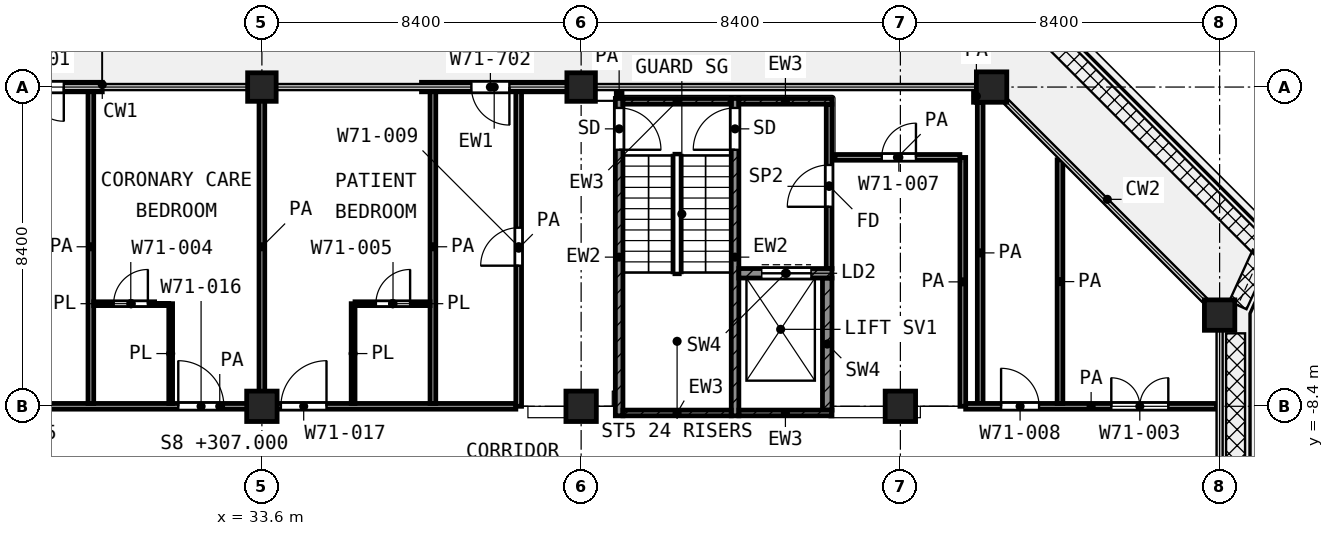
"""IFC4 building model, lengths in metres.
Left out: names, types, materials, properties, quantities, classifications, styles, units other than length and angle.
Written with IfcOpenShell. Run it as: python <this file> out.ifc"""

import sys

from ifc_helpers import new_model, si_unit, direction, frame, frame_2d, origin, origin_2d, place, context, subcontext, project, spatial, rectangle, extrude, element, fill, save


model = new_model("IFC4")
c1 = context("Model", 3, precision=1e-05, world=origin(), true_north=direction((0.0, 1.0)))
c2 = subcontext(c1, "Body", "Model", "MODEL_VIEW")
j1 = project(units=[si_unit("LENGTHUNIT", "METRE"), si_unit("PLANEANGLEUNIT", "RADIAN")], contexts=[c1])
p1 = place(None, origin())
s1 = spatial("IfcSite", under=j1, at=p1, CompositionType="ELEMENT")
p2 = place(p1, origin())
s2 = spatial("IfcBuilding", under=s1, at=p2, CompositionType="ELEMENT")
p3 = place(p2, frame((0.0, 0.0, 307.0)))
s3 = spatial("IfcBuildingStorey", under=s2, at=p3, CompositionType="ELEMENT", Elevation=307.0)
for number, where, z_axis, x_axis in (
    (1, (33.6, 0.0, 0.0), (0.0, 0.0, 1.0), (1.0, 0.0, 0.0)),
    (2, (42.0, 0.0, 0.0), (0.0, 0.0, 1.0), (1.0, 0.0, 0.0)),
):
    element("IfcColumn", number, at=place(p3, frame(where, z_axis=z_axis, x_axis=x_axis)), inside=s3, PredefinedType="COLUMN", context=c2, shape_type="SweptSolid", body=[
        extrude(rectangle(XDim=0.75, YDim=0.75, at=origin_2d()), origin(), (0.0, 0.0, 1.0), 4.2),
    ])
for number, where, z_axis, x_axis in (
    (3, (52.8, 0.0, 0.0), (0.0, 0.0, 1.0), (1.0, 0.0, 0.0)),
    (4, (58.8, -6.0, 0.0), (0.0, 0.0, 1.0), (1.0, 0.0, 0.0)),
    (5, (33.6, -8.4, 0.0), (0.0, 0.0, 1.0), (1.0, 0.0, 0.0)),
    (6, (42.0, -8.4, 0.0), (0.0, 0.0, 1.0), (1.0, 0.0, 0.0)),
    (7, (50.4, -8.4, 0.0), (0.0, 0.0, 1.0), (1.0, 0.0, 0.0)),
):
    element("IfcColumn", number, at=place(p3, frame(where, z_axis=z_axis, x_axis=x_axis)), inside=s3, PredefinedType="COLUMN", context=c2, shape_type="SweptSolid", body=[
        extrude(rectangle(XDim=0.8, YDim=0.8, at=origin_2d()), origin(), (0.0, 0.0, 1.0), 4.2),
    ])
p4 = place(p3, frame((41.625, 0.0, 0.0), z_axis=(0.0, 0.0, 1.0), x_axis=(-1.0, 0.0, 0.0)))
e8 = element("IfcWall", 8, at=p4, inside=s3, PredefinedType="SOLIDWALL", context=c2, shape_type="SweptSolid", body=[
    extrude(rectangle(XDim=3.825, YDim=0.25, at=frame_2d((1.913, 0.0))), origin(), (0.0, 0.0, 1.0), 3.48),
])
p5 = place(p4, frame((1.512, 0.0, 0.0)))
e9 = element("IfcOpeningElement", 9, at=p5, cuts=e8, PredefinedType="OPENING", context=c2, shape_type="SweptSolid", body=[
    extrude(rectangle(XDim=1.0, YDim=2.1, at=frame_2d((0.5, 1.05))), frame((0.0, 0.135, 0.0), z_axis=(0.0, -1.0, 0.0), x_axis=(1.0, 0.0, 0.0)), (0.0, 0.0, 1.0), 0.27),
])
p6 = place(p3, frame((29.4, 0.0, 0.0), z_axis=(0.0, 0.0, 1.0), x_axis=(-1.0, 0.0, 0.0)))
e10 = element("IfcWall", 10, at=p6, inside=s3, PredefinedType="SOLIDWALL", context=c2, shape_type="SweptSolid", body=[
    extrude(rectangle(XDim=3.825, YDim=0.25, at=frame_2d((1.913, 0.0))), origin(), (0.0, 0.0, 1.0), 3.48),
])
p7 = place(p6, frame((1.012, 0.0, 0.0)))
e11 = element("IfcOpeningElement", 11, at=p7, cuts=e10, PredefinedType="OPENING", context=c2, shape_type="SweptSolid", body=[
    extrude(rectangle(XDim=1.8, YDim=2.1, at=frame_2d((0.9, 1.05))), frame((0.0, 0.135, 0.0), z_axis=(0.0, -1.0, 0.0), x_axis=(1.0, 0.0, 0.0)), (0.0, 0.0, 1.0), 0.27),
])
p8 = place(p3, frame((43.0, -8.65, 0.0), z_axis=(0.0, 0.0, 1.0), x_axis=(0.0, 1.0, 0.0)))
e12 = element("IfcWall", 12, at=p8, inside=s3, PredefinedType="SHEAR", context=c2, shape_type="SweptSolid", body=[
    extrude(rectangle(XDim=8.35, YDim=0.2, at=frame_2d((4.175, 0.0))), origin(), (0.0, 0.0, 1.0), 3.6),
])
p9 = place(p8, frame((7.0, 0.0, 0.0)))
e13 = element("IfcOpeningElement", 13, at=p9, cuts=e12, PredefinedType="OPENING", context=c2, shape_type="SweptSolid", body=[
    extrude(rectangle(XDim=1.1, YDim=2.1, at=frame_2d((0.55, 1.05))), frame((0.0, 0.11, 0.0), z_axis=(0.0, -1.0, 0.0), x_axis=(1.0, 0.0, 0.0)), (0.0, 0.0, 1.0), 0.22),
])
p10 = place(p3, frame((46.05, -8.65, 0.0), z_axis=(0.0, 0.0, 1.0), x_axis=(0.0, 1.0, 0.0)))
e14 = element("IfcWall", 14, at=p10, inside=s3, PredefinedType="SHEAR", context=c2, shape_type="SweptSolid", body=[
    extrude(rectangle(XDim=8.35, YDim=0.2, at=frame_2d((4.175, 0.0))), origin(), (0.0, 0.0, 1.0), 3.6),
])
p11 = place(p10, frame((7.0, 0.0, 0.0)))
e15 = element("IfcOpeningElement", 15, at=p11, cuts=e14, PredefinedType="OPENING", context=c2, shape_type="SweptSolid", body=[
    extrude(rectangle(XDim=1.1, YDim=2.1, at=frame_2d((0.55, 1.05))), frame((0.0, 0.11, 0.0), z_axis=(0.0, -1.0, 0.0), x_axis=(1.0, 0.0, 0.0)), (0.0, 0.0, 1.0), 0.22),
])
p12 = place(p3, frame((43.1, -0.375, 0.0), z_axis=(0.0, 0.0, 1.0), x_axis=(1.0, 0.0, 0.0)))
e16 = element("IfcWall", 16, at=p12, inside=s3, PredefinedType="SHEAR", context=c2, shape_type="SweptSolid", body=[
    extrude(rectangle(XDim=2.85, YDim=0.15, at=frame_2d((1.425, 0.0))), origin(), (0.0, 0.0, 1.0), 3.6),
])
p13 = place(p3, frame((46.15, -0.375, 0.0), z_axis=(0.0, 0.0, 1.0), x_axis=(1.0, 0.0, 0.0)))
e17 = element("IfcWall", 17, at=p13, inside=s3, PredefinedType="SHEAR", context=c2, shape_type="SweptSolid", body=[
    extrude(rectangle(XDim=2.45, YDim=0.15, at=frame_2d((1.225, 0.0))), origin(), (0.0, 0.0, 1.0), 3.6),
])
p14 = place(p3, frame((43.1, -8.575, 0.0), z_axis=(0.0, 0.0, 1.0), x_axis=(1.0, 0.0, 0.0)))
e18 = element("IfcWall", 18, at=p14, inside=s3, PredefinedType="SHEAR", context=c2, shape_type="SweptSolid", body=[
    extrude(rectangle(XDim=2.85, YDim=0.15, at=frame_2d((1.425, 0.0))), origin(), (0.0, 0.0, 1.0), 3.6),
])
p15 = place(p3, frame((46.15, -8.575, 0.0), z_axis=(0.0, 0.0, 1.0), x_axis=(1.0, 0.0, 0.0)))
e19 = element("IfcWall", 19, at=p15, inside=s3, PredefinedType="SHEAR", context=c2, shape_type="SweptSolid", body=[
    extrude(rectangle(XDim=2.45, YDim=0.15, at=frame_2d((1.225, 0.0))), origin(), (0.0, 0.0, 1.0), 3.6),
])
p16 = place(p3, frame((46.15, -4.9, 0.0), z_axis=(0.0, 0.0, 1.0), x_axis=(1.0, 0.0, 0.0)))
e20 = element("IfcWall", 20, at=p16, inside=s3, PredefinedType="SHEAR", context=c2, shape_type="SweptSolid", body=[
    extrude(rectangle(XDim=2.45, YDim=0.25, at=frame_2d((1.225, 0.0))), origin(), (0.0, 0.0, 1.0), 3.6),
])
p17 = place(p16, frame((0.6, 0.0, 0.0)))
e21 = element("IfcOpeningElement", 21, at=p17, cuts=e20, PredefinedType="OPENING", context=c2, shape_type="SweptSolid", body=[
    extrude(rectangle(XDim=1.3, YDim=2.1, at=frame_2d((0.65, 1.05))), frame((0.0, 0.135, 0.0), z_axis=(0.0, -1.0, 0.0), x_axis=(1.0, 0.0, 0.0)), (0.0, 0.0, 1.0), 0.27),
])
p18 = place(p3, frame((48.475, -8.5, 0.0), z_axis=(0.0, 0.0, 1.0), x_axis=(0.0, 1.0, 0.0)))
e22 = element("IfcWall", 22, at=p18, inside=s3, PredefinedType="SHEAR", context=c2, shape_type="SweptSolid", body=[
    extrude(rectangle(XDim=3.475, YDim=0.25, at=frame_2d((1.738, 0.0))), origin(), (0.0, 0.0, 1.0), 3.6),
])
p19 = place(p3, frame((48.525, -4.775, 0.0), z_axis=(0.0, 0.0, 1.0), x_axis=(0.0, 1.0, 0.0)))
e23 = element("IfcWall", 23, at=p19, inside=s3, PredefinedType="PARTITIONING", context=c2, shape_type="SweptSolid", body=[
    extrude(rectangle(XDim=4.325, YDim=0.15, at=frame_2d((2.163, 0.0))), origin(), (0.0, 0.0, 1.0), 3.6),
])
p20 = place(p19, frame((1.625, 0.0, 0.0)))
e24 = element("IfcOpeningElement", 24, at=p20, cuts=e23, PredefinedType="OPENING", context=c2, shape_type="SweptSolid", body=[
    extrude(rectangle(XDim=1.1, YDim=2.1, at=frame_2d((0.55, 1.05))), frame((0.0, 0.085, 0.0), z_axis=(0.0, -1.0, 0.0), x_axis=(1.0, 0.0, 0.0)), (0.0, 0.0, 1.0), 0.17),
])
p21 = place(p3, frame((29.175, -5.7, 0.0), z_axis=(0.0, 0.0, 1.0), x_axis=(1.0, 0.0, 0.0)))
e25 = element("IfcWall", 25, at=p21, inside=s3, PredefinedType="PARTITIONING", context=c2, shape_type="SweptSolid", body=[
    extrude(rectangle(XDim=1.975, YDim=0.1, at=frame_2d((0.987, 0.0))), origin(), (0.0, 0.0, 1.0), 3.6),
])
p22 = place(p21, frame((0.525, 0.0, 0.0)))
e26 = element("IfcOpeningElement", 26, at=p22, cuts=e25, PredefinedType="OPENING", context=c2, shape_type="SweptSolid", body=[
    extrude(rectangle(XDim=0.9, YDim=2.1, at=frame_2d((0.45, 1.05))), frame((0.0, 0.06, 0.0), z_axis=(0.0, -1.0, 0.0), x_axis=(1.0, 0.0, 0.0)), (0.0, 0.0, 1.0), 0.12),
])
p23 = place(p3, frame((36.05, -5.7, 0.0), z_axis=(0.0, 0.0, 1.0), x_axis=(1.0, 0.0, 0.0)))
e27 = element("IfcWall", 27, at=p23, inside=s3, PredefinedType="PARTITIONING", context=c2, shape_type="SweptSolid", body=[
    extrude(rectangle(XDim=1.975, YDim=0.1, at=frame_2d((0.987, 0.0))), origin(), (0.0, 0.0, 1.0), 3.6),
])
p24 = place(p23, frame((0.55, 0.0, 0.0)))
e28 = element("IfcOpeningElement", 28, at=p24, cuts=e27, PredefinedType="OPENING", context=c2, shape_type="SweptSolid", body=[
    extrude(rectangle(XDim=0.9, YDim=2.1, at=frame_2d((0.45, 1.05))), frame((0.0, 0.06, 0.0), z_axis=(0.0, -1.0, 0.0), x_axis=(1.0, 0.0, 0.0)), (0.0, 0.0, 1.0), 0.12),
])
for number, where, z_axis, x_axis in (
    (29, (31.2, -8.325, 0.0), (0.0, 0.0, 1.0), (0.0, 1.0, 0.0)),
    (30, (36.0, -8.325, 0.0), (0.0, 0.0, 1.0), (0.0, 1.0, 0.0)),
):
    element("IfcWall", number, at=place(p3, frame(where, z_axis=z_axis, x_axis=x_axis)), inside=s3, PredefinedType="PARTITIONING", context=c2, shape_type="SweptSolid", body=[
        extrude(rectangle(XDim=2.625, YDim=0.1, at=frame_2d((1.312, 0.0))), origin(), (0.0, 0.0, 1.0), 3.6),
    ])
p25 = place(p3, frame((24.7, -8.4, 0.0), z_axis=(0.0, 0.0, 1.0), x_axis=(1.0, 0.0, 0.0)))
e31 = element("IfcWall", 31, at=p25, inside=s3, PredefinedType="PARTITIONING", context=c2, shape_type="SweptSolid", body=[
    extrude(rectangle(XDim=15.582, YDim=0.15, at=frame_2d((7.791, 0.0))), origin(), (0.0, 0.0, 1.0), 3.6),
])
p26 = place(p25, frame((1.85, 0.0, 0.0)))
e32 = element("IfcOpeningElement", 32, at=p26, cuts=e31, PredefinedType="OPENING", context=c2, shape_type="SweptSolid", body=[
    extrude(rectangle(XDim=1.2, YDim=2.1, at=frame_2d((0.6, 1.05))), frame((0.0, 0.085, 0.0), z_axis=(0.0, -1.0, 0.0), x_axis=(1.0, 0.0, 0.0)), (0.0, 0.0, 1.0), 0.17),
])
p27 = place(p25, frame((6.7, 0.0, 0.0)))
e33 = element("IfcOpeningElement", 33, at=p27, cuts=e31, PredefinedType="OPENING", context=c2, shape_type="SweptSolid", body=[
    extrude(rectangle(XDim=1.2, YDim=2.1, at=frame_2d((0.6, 1.05))), frame((0.0, 0.085, 0.0), z_axis=(0.0, -1.0, 0.0), x_axis=(1.0, 0.0, 0.0)), (0.0, 0.0, 1.0), 0.17),
])
p28 = place(p25, frame((9.4, 0.0, 0.0)))
e34 = element("IfcOpeningElement", 34, at=p28, cuts=e31, PredefinedType="OPENING", context=c2, shape_type="SweptSolid", body=[
    extrude(rectangle(XDim=1.2, YDim=2.1, at=frame_2d((0.6, 1.05))), frame((0.0, 0.085, 0.0), z_axis=(0.0, -1.0, 0.0), x_axis=(1.0, 0.0, 0.0)), (0.0, 0.0, 1.0), 0.17),
])
p29 = place(p3, frame((52.118, -8.4, 0.0), z_axis=(0.0, 0.0, 1.0), x_axis=(1.0, 0.0, 0.0)))
e35 = element("IfcWall", 35, at=p29, inside=s3, PredefinedType="PARTITIONING", context=c2, shape_type="SweptSolid", body=[
    extrude(rectangle(XDim=6.602, YDim=0.15, at=frame_2d((3.301, 0.0))), origin(), (0.0, 0.0, 1.0), 3.6),
])
p30 = place(p29, frame((0.932, 0.0, 0.0)))
e36 = element("IfcOpeningElement", 36, at=p30, cuts=e35, PredefinedType="OPENING", context=c2, shape_type="SweptSolid", body=[
    extrude(rectangle(XDim=1.0, YDim=2.1, at=frame_2d((0.5, 1.05))), frame((0.0, 0.085, 0.0), z_axis=(0.0, -1.0, 0.0), x_axis=(1.0, 0.0, 0.0)), (0.0, 0.0, 1.0), 0.17),
])
p31 = place(p29, frame((3.832, 0.0, 0.0)))
e37 = element("IfcOpeningElement", 37, at=p31, cuts=e35, PredefinedType="OPENING", context=c2, shape_type="SweptSolid", body=[
    extrude(rectangle(XDim=1.5, YDim=2.1, at=frame_2d((0.75, 1.05))), frame((0.0, 0.085, 0.0), z_axis=(0.0, -1.0, 0.0), x_axis=(1.0, 0.0, 0.0)), (0.0, 0.0, 1.0), 0.17),
])
p32 = place(p3, frame((48.68, -1.85, 0.0), z_axis=(0.0, 0.0, 1.0), x_axis=(1.0, 0.0, 0.0)))
e38 = element("IfcWall", 38, at=p32, inside=s3, PredefinedType="PARTITIONING", context=c2, shape_type="SweptSolid", body=[
    extrude(rectangle(XDim=3.286, YDim=0.15, at=frame_2d((1.643, 0.0))), origin(), (0.0, 0.0, 1.0), 3.6),
])
p33 = place(p32, frame((1.23, 0.0, 0.0)))
e39 = element("IfcOpeningElement", 39, at=p33, cuts=e38, PredefinedType="OPENING", context=c2, shape_type="SweptSolid", body=[
    extrude(rectangle(XDim=0.9, YDim=2.1, at=frame_2d((0.45, 1.05))), frame((0.0, 0.085, 0.0), z_axis=(0.0, -1.0, 0.0), x_axis=(1.0, 0.0, 0.0)), (0.0, 0.0, 1.0), 0.17),
])
for number, where, z_axis, x_axis in (
    (40, (29.1, -8.325, 0.0), (0.0, 0.0, 1.0), (0.0, 1.0, 0.0)),
    (41, (33.6, -8.325, 0.0), (0.0, 0.0, 1.0), (0.0, 1.0, 0.0)),
    (42, (38.1, -8.325, 0.0), (0.0, 0.0, 1.0), (0.0, 1.0, 0.0)),
):
    element("IfcWall", number, at=place(p3, frame(where, z_axis=z_axis, x_axis=x_axis)), inside=s3, PredefinedType="PARTITIONING", context=c2, shape_type="SweptSolid", body=[
        extrude(rectangle(XDim=8.245, YDim=0.15, at=frame_2d((4.123, 0.0))), origin(), (0.0, 0.0, 1.0), 3.6),
    ])
p34 = place(p3, frame((40.357, -8.4, 0.0), z_axis=(0.0, 0.0, 1.0), x_axis=(0.0, 1.0, 0.0)))
e43 = element("IfcWall", 43, at=p34, inside=s3, PredefinedType="PARTITIONING", context=c2, shape_type="SweptSolid", body=[
    extrude(rectangle(XDim=8.32, YDim=0.15, at=frame_2d((4.16, 0.0))), origin(), (0.0, 0.0, 1.0), 3.6),
])
p35 = place(p34, frame((3.7, 0.0, 0.0)))
e44 = element("IfcOpeningElement", 44, at=p35, cuts=e43, PredefinedType="OPENING", context=c2, shape_type="SweptSolid", body=[
    extrude(rectangle(XDim=1.0, YDim=2.1, at=frame_2d((0.5, 1.05))), frame((0.0, 0.085, 0.0), z_axis=(0.0, -1.0, 0.0), x_axis=(1.0, 0.0, 0.0)), (0.0, 0.0, 1.0), 0.17),
])
p36 = place(p3, frame((43.0, -0.27, 0.0), z_axis=(0.0, 0.0, 1.0), x_axis=(0.0, 1.0, 0.0)))
e45 = element("IfcWall", 45, at=p36, inside=s3, PredefinedType="PARTITIONING", context=c2, shape_type="SweptSolid", body=[
    extrude(rectangle(XDim=0.19, YDim=0.15, at=frame_2d((0.095, 0.0))), origin(), (0.0, 0.0, 1.0), 3.6),
])
p37 = place(p3, frame((52.043, -8.4, 0.0), z_axis=(0.0, 0.0, 1.0), x_axis=(0.0, 1.0, 0.0)))
e46 = element("IfcWall", 46, at=p37, inside=s3, PredefinedType="PARTITIONING", context=c2, shape_type="SweptSolid", body=[
    extrude(rectangle(XDim=6.548, YDim=0.15, at=frame_2d((3.274, 0.0))), origin(), (0.0, 0.0, 1.0), 3.6),
])
p38 = place(p3, frame((52.4, -0.4, 0.0), z_axis=(0.0, 0.0, 1.0), x_axis=(0.0, 1.0, 0.0)))
e47 = element("IfcWall", 47, at=p38, inside=s3, PredefinedType="PARTITIONING", context=c2, shape_type="SweptSolid", body=[
    extrude(rectangle(XDim=0.32, YDim=0.15, at=frame_2d((0.16, 0.0))), origin(), (0.0, 0.0, 1.0), 3.6),
])
p39 = place(p3, frame((52.5, -8.325, 0.0), z_axis=(0.0, 0.0, 1.0), x_axis=(0.0, 1.0, 0.0)))
e48 = element("IfcWall", 48, at=p39, inside=s3, PredefinedType="PARTITIONING", context=c2, shape_type="SweptSolid", body=[
    extrude(rectangle(XDim=7.923, YDim=0.15, at=frame_2d((3.961, 0.0))), origin(), (0.0, 0.0, 1.0), 3.6),
])
p40 = place(p3, frame((54.6, -8.325, 0.0), z_axis=(0.0, 0.0, 1.0), x_axis=(0.0, 1.0, 0.0)))
e49 = element("IfcWall", 49, at=p40, inside=s3, PredefinedType="PARTITIONING", context=c2, shape_type="SweptSolid", body=[
    extrude(rectangle(XDim=6.412, YDim=0.15, at=frame_2d((3.206, 0.0))), origin(), (0.0, 0.0, 1.0), 3.6),
])
p41 = place(p5, origin())
e50 = element("IfcDoor", 50, at=p41, inside=s3, OperationType="SINGLE_SWING_LEFT", PredefinedType="DOOR", context=c2, shape_type="SweptSolid", body=[
    extrude(rectangle(XDim=1.0, YDim=2.1, at=frame_2d((0.5, 1.05))), frame((0.0, 0.025, 0.0), z_axis=(0.0, -1.0, 0.0), x_axis=(1.0, 0.0, 0.0)), (0.0, 0.0, 1.0), 0.05),
])
fill(e9, e50)
p42 = place(p7, origin())
e51 = element("IfcDoor", 51, at=p42, inside=s3, OperationType="DOUBLE_DOOR_SINGLE_SWING", PredefinedType="DOOR", context=c2, shape_type="SweptSolid", body=[
    extrude(rectangle(XDim=1.8, YDim=2.1, at=frame_2d((0.9, 1.05))), frame((0.0, 0.025, 0.0), z_axis=(0.0, -1.0, 0.0), x_axis=(1.0, 0.0, 0.0)), (0.0, 0.0, 1.0), 0.05),
])
fill(e11, e51)
p43 = place(p9, frame((1.1, 0.0, 0.0), z_axis=(0.0, 0.0, 1.0), x_axis=(-1.0, 0.0, 0.0)))
e52 = element("IfcDoor", 52, at=p43, inside=s3, OperationType="SINGLE_SWING_LEFT", PredefinedType="DOOR", context=c2, shape_type="SweptSolid", body=[
    extrude(rectangle(XDim=1.1, YDim=2.1, at=frame_2d((0.55, 1.05))), frame((0.0, 0.025, 0.0), z_axis=(0.0, -1.0, 0.0), x_axis=(1.0, 0.0, 0.0)), (0.0, 0.0, 1.0), 0.05),
])
fill(e13, e52)
p44 = place(p11, origin())
e53 = element("IfcDoor", 53, at=p44, inside=s3, OperationType="SINGLE_SWING_LEFT", PredefinedType="DOOR", context=c2, shape_type="SweptSolid", body=[
    extrude(rectangle(XDim=1.1, YDim=2.1, at=frame_2d((0.55, 1.05))), frame((0.0, 0.025, 0.0), z_axis=(0.0, -1.0, 0.0), x_axis=(1.0, 0.0, 0.0)), (0.0, 0.0, 1.0), 0.05),
])
fill(e15, e53)
p45 = place(p17, origin())
e54 = element("IfcDoor", 54, at=p45, inside=s3, OperationType="DOUBLE_DOOR_SLIDING", PredefinedType="DOOR", context=c2, shape_type="SweptSolid", body=[
    extrude(rectangle(XDim=1.3, YDim=2.1, at=frame_2d((0.65, 1.05))), frame((0.0, 0.025, 0.0), z_axis=(0.0, -1.0, 0.0), x_axis=(1.0, 0.0, 0.0)), (0.0, 0.0, 1.0), 0.05),
])
fill(e21, e54)
p46 = place(p20, origin())
e55 = element("IfcDoor", 55, at=p46, inside=s3, OperationType="SINGLE_SWING_LEFT", PredefinedType="DOOR", context=c2, shape_type="SweptSolid", body=[
    extrude(rectangle(XDim=1.1, YDim=2.1, at=frame_2d((0.55, 1.05))), frame((0.0, 0.025, 0.0), z_axis=(0.0, -1.0, 0.0), x_axis=(1.0, 0.0, 0.0)), (0.0, 0.0, 1.0), 0.05),
])
fill(e24, e55)
p47 = place(p27, origin())
e56 = element("IfcDoor", 56, at=p47, inside=s3, OperationType="SINGLE_SWING_LEFT", PredefinedType="DOOR", context=c2, shape_type="SweptSolid", body=[
    extrude(rectangle(XDim=1.2, YDim=2.1, at=frame_2d((0.6, 1.05))), frame((0.0, 0.025, 0.0), z_axis=(0.0, -1.0, 0.0), x_axis=(1.0, 0.0, 0.0)), (0.0, 0.0, 1.0), 0.05),
])
fill(e33, e56)
p48 = place(p22, origin())
e57 = element("IfcDoor", 57, at=p48, inside=s3, OperationType="SINGLE_SWING_RIGHT", PredefinedType="DOOR", context=c2, shape_type="SweptSolid", body=[
    extrude(rectangle(XDim=0.9, YDim=2.1, at=frame_2d((0.45, 1.05))), frame((0.0, 0.025, 0.0), z_axis=(0.0, -1.0, 0.0), x_axis=(1.0, 0.0, 0.0)), (0.0, 0.0, 1.0), 0.05),
])
fill(e26, e57)
p49 = place(p28, origin())
e58 = element("IfcDoor", 58, at=p49, inside=s3, OperationType="SINGLE_SWING_RIGHT", PredefinedType="DOOR", context=c2, shape_type="SweptSolid", body=[
    extrude(rectangle(XDim=1.2, YDim=2.1, at=frame_2d((0.6, 1.05))), frame((0.0, 0.025, 0.0), z_axis=(0.0, -1.0, 0.0), x_axis=(1.0, 0.0, 0.0)), (0.0, 0.0, 1.0), 0.05),
])
fill(e34, e58)
p50 = place(p24, origin())
e59 = element("IfcDoor", 59, at=p50, inside=s3, OperationType="SINGLE_SWING_RIGHT", PredefinedType="DOOR", context=c2, shape_type="SweptSolid", body=[
    extrude(rectangle(XDim=0.9, YDim=2.1, at=frame_2d((0.45, 1.05))), frame((0.0, 0.025, 0.0), z_axis=(0.0, -1.0, 0.0), x_axis=(1.0, 0.0, 0.0)), (0.0, 0.0, 1.0), 0.05),
])
fill(e28, e59)
p51 = place(p35, origin())
e60 = element("IfcDoor", 60, at=p51, inside=s3, OperationType="SINGLE_SWING_LEFT", PredefinedType="DOOR", context=c2, shape_type="SweptSolid", body=[
    extrude(rectangle(XDim=1.0, YDim=2.1, at=frame_2d((0.5, 1.05))), frame((0.0, 0.025, 0.0), z_axis=(0.0, -1.0, 0.0), x_axis=(1.0, 0.0, 0.0)), (0.0, 0.0, 1.0), 0.05),
])
fill(e44, e60)
p52 = place(p33, origin())
e61 = element("IfcDoor", 61, at=p52, inside=s3, OperationType="SINGLE_SWING_RIGHT", PredefinedType="DOOR", context=c2, shape_type="SweptSolid", body=[
    extrude(rectangle(XDim=0.9, YDim=2.1, at=frame_2d((0.45, 1.05))), frame((0.0, 0.025, 0.0), z_axis=(0.0, -1.0, 0.0), x_axis=(1.0, 0.0, 0.0)), (0.0, 0.0, 1.0), 0.05),
])
fill(e39, e61)
p53 = place(p30, origin())
e62 = element("IfcDoor", 62, at=p53, inside=s3, OperationType="SINGLE_SWING_LEFT", PredefinedType="DOOR", context=c2, shape_type="SweptSolid", body=[
    extrude(rectangle(XDim=1.0, YDim=2.1, at=frame_2d((0.5, 1.05))), frame((0.0, 0.025, 0.0), z_axis=(0.0, -1.0, 0.0), x_axis=(1.0, 0.0, 0.0)), (0.0, 0.0, 1.0), 0.05),
])
fill(e36, e62)
p54 = place(p31, origin())
e63 = element("IfcDoor", 63, at=p54, inside=s3, OperationType="DOUBLE_DOOR_SINGLE_SWING", PredefinedType="DOOR", context=c2, shape_type="SweptSolid", body=[
    extrude(rectangle(XDim=1.5, YDim=2.1, at=frame_2d((0.75, 1.05))), frame((0.0, 0.025, 0.0), z_axis=(0.0, -1.0, 0.0), x_axis=(1.0, 0.0, 0.0)), (0.0, 0.0, 1.0), 0.05),
])
fill(e37, e63)
save(model, sys.argv[1])
